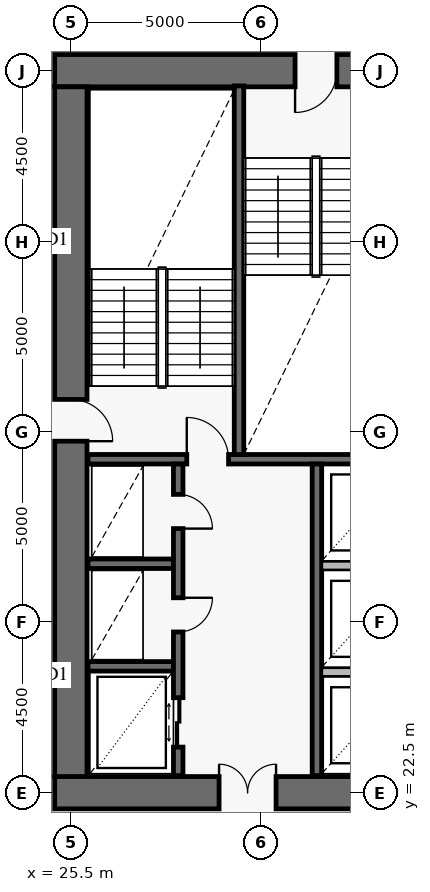
"""IFC4 building model, lengths in metres.
Left out: names, types, materials, properties, quantities, classifications, styles, units other than length and angle.
Written with IfcOpenShell. Run it as: python <this file> out.ifc"""

import sys

from ifc_helpers import new_model, si_unit, direction, frame, frame_2d, origin, place, context, subcontext, project, spatial, rectangle, extrude, element, fill, save


model = new_model("IFC4")
c1 = context("Model", 3, precision=1e-05, world=origin(), true_north=direction((0.0, 1.0)))
c2 = subcontext(c1, "Body", "Model", "MODEL_VIEW")
j1 = project(units=[si_unit("LENGTHUNIT", "METRE"), si_unit("PLANEANGLEUNIT", "RADIAN")], contexts=[c1])
p1 = place(None, origin())
s1 = spatial("IfcSite", under=j1, at=p1, CompositionType="ELEMENT")
p2 = place(p1, origin())
s2 = spatial("IfcBuilding", under=s1, at=p2, CompositionType="ELEMENT")
p3 = place(p2, frame((0.0, 0.0, 28.8)))
s3 = spatial("IfcBuildingStorey", under=s2, at=p3, CompositionType="ELEMENT", Elevation=28.8)
p4 = place(p3, frame((25.075, 22.5, 0.0), z_axis=(0.0, 0.0, 1.0), x_axis=(1.0, 0.0, 0.0)))
e1 = element("IfcWall", 1, at=p4, inside=s3, PredefinedType="SHEAR", context=c2, shape_type="SweptSolid", body=[
    extrude(rectangle(XDim=9.975, YDim=0.85, at=frame_2d((4.988, 0.0))), origin(), (0.0, 0.0, 1.0), 4.2),
])
p5 = place(p4, frame((4.325, 0.0, 0.0)))
e2 = element("IfcOpeningElement", 2, at=p5, cuts=e1, PredefinedType="OPENING", context=c2, shape_type="SweptSolid", body=[
    extrude(rectangle(XDim=1.5, YDim=2.15, at=frame_2d((0.75, 1.075))), frame((0.0, 0.437, 0.0), z_axis=(0.0, -1.0, 0.0), x_axis=(1.0, 0.0, 0.0)), (0.0, 0.0, 1.0), 0.874),
])
p6 = place(p3, frame((36.75, 41.5, 0.0), z_axis=(0.0, 0.0, 1.0), x_axis=(-1.0, 0.0, 0.0)))
e3 = element("IfcWall", 3, at=p6, inside=s3, PredefinedType="SHEAR", context=c2, shape_type="SweptSolid", body=[
    extrude(rectangle(XDim=11.675, YDim=0.85, at=frame_2d((5.837, 0.0))), origin(), (0.0, 0.0, 1.0), 4.2),
])
p7 = place(p6, frame((4.25, 0.0, 0.0)))
e4 = element("IfcOpeningElement", 4, at=p7, cuts=e3, PredefinedType="OPENING", context=c2, shape_type="SweptSolid", body=[
    extrude(rectangle(XDim=1.1, YDim=2.15, at=frame_2d((0.55, 1.075))), frame((0.0, 0.437, 0.0), z_axis=(0.0, -1.0, 0.0), x_axis=(1.0, 0.0, 0.0)), (0.0, 0.0, 1.0), 0.874),
])
p8 = place(p3, frame((25.5, 22.925, 0.0), z_axis=(0.0, 0.0, 1.0), x_axis=(0.0, 1.0, 0.0)))
e5 = element("IfcWall", 5, at=p8, inside=s3, PredefinedType="SHEAR", context=c2, shape_type="SweptSolid", body=[
    extrude(rectangle(XDim=18.15, YDim=0.85, at=frame_2d((9.075, 0.0))), origin(), (0.0, 0.0, 1.0), 4.2),
])
p9 = place(p8, frame((8.825, 0.0, 0.0)))
e6 = element("IfcOpeningElement", 6, at=p9, cuts=e5, PredefinedType="OPENING", context=c2, shape_type="SweptSolid", body=[
    extrude(rectangle(XDim=1.1, YDim=2.15, at=frame_2d((0.55, 1.075))), frame((0.0, 0.437, 0.0), z_axis=(0.0, -1.0, 0.0), x_axis=(1.0, 0.0, 0.0)), (0.0, 0.0, 1.0), 0.874),
])
p10 = place(p3, frame((25.95, 31.275, 0.0), z_axis=(0.0, 0.0, 1.0), x_axis=(1.0, 0.0, 0.0)))
e7 = element("IfcWall", 7, at=p10, inside=s3, PredefinedType="SOLIDWALL", context=c2, shape_type="SweptSolid", body=[
    extrude(rectangle(XDim=20.1, YDim=0.25, at=frame_2d((10.05, 0.0))), origin(), (0.0, 0.0, 1.0), 4.2),
])
p11 = place(p10, frame((2.6, 0.0, 0.0)))
e8 = element("IfcOpeningElement", 8, at=p11, cuts=e7, PredefinedType="OPENING", context=c2, shape_type="SweptSolid", body=[
    extrude(rectangle(XDim=1.1, YDim=2.15, at=frame_2d((0.55, 1.075))), frame((0.0, 0.137, 0.0), z_axis=(0.0, -1.0, 0.0), x_axis=(1.0, 0.0, 0.0)), (0.0, 0.0, 1.0), 0.274),
])
p12 = place(p10, frame((10.6, 0.0, 0.0)))
e9 = element("IfcOpeningElement", 9, at=p12, cuts=e7, PredefinedType="OPENING", context=c2, shape_type="SweptSolid", body=[
    extrude(rectangle(XDim=1.1, YDim=2.15, at=frame_2d((0.55, 1.075))), frame((0.0, 0.137, 0.0), z_axis=(0.0, -1.0, 0.0), x_axis=(1.0, 0.0, 0.0)), (0.0, 0.0, 1.0), 0.274),
])
p13 = place(p10, frame((16.35, 0.0, 0.0)))
e10 = element("IfcOpeningElement", 10, at=p13, cuts=e7, PredefinedType="OPENING", context=c2, shape_type="SweptSolid", body=[
    extrude(rectangle(XDim=1.1, YDim=2.15, at=frame_2d((0.55, 1.075))), frame((0.0, 0.137, 0.0), z_axis=(0.0, -1.0, 0.0), x_axis=(1.0, 0.0, 0.0)), (0.0, 0.0, 1.0), 0.274),
])
p14 = place(p3, frame((29.925, 31.4, 0.0), z_axis=(0.0, 0.0, 1.0), x_axis=(0.0, 1.0, 0.0)))
e11 = element("IfcWall", 11, at=p14, inside=s3, PredefinedType="SOLIDWALL", context=c2, shape_type="SweptSolid", body=[
    extrude(rectangle(XDim=9.7, YDim=0.25, at=frame_2d((4.85, 0.0))), origin(), (0.0, 0.0, 1.0), 4.2),
])
for number, where, z_axis, x_axis in (
    (12, (25.95, 25.825, 0.0), (0.0, 0.0, 1.0), (1.0, 0.0, 0.0)),
    (13, (25.95, 28.525, 0.0), (0.0, 0.0, 1.0), (1.0, 0.0, 0.0)),
):
    element("IfcWall", number, at=place(p3, frame(where, z_axis=z_axis, x_axis=x_axis)), inside=s3, PredefinedType="SOLIDWALL", context=c2, shape_type="SweptSolid", body=[
        extrude(rectangle(XDim=2.25, YDim=0.25, at=frame_2d((1.125, 0.0))), origin(), (0.0, 0.0, 1.0), 4.2),
    ])
p15 = place(p3, frame((28.325, 22.95, 0.0), z_axis=(0.0, 0.0, 1.0), x_axis=(0.0, 1.0, 0.0)))
e14 = element("IfcWall", 14, at=p15, inside=s3, PredefinedType="SOLIDWALL", context=c2, shape_type="SweptSolid", body=[
    extrude(rectangle(XDim=8.2, YDim=0.25, at=frame_2d((4.1, 0.0))), origin(), (0.0, 0.0, 1.0), 4.2),
])
p16 = place(p15, frame((0.75, 0.0, 0.0)))
e15 = element("IfcOpeningElement", 15, at=p16, cuts=e14, PredefinedType="OPENING", context=c2, shape_type="SweptSolid", body=[
    extrude(rectangle(XDim=1.3, YDim=2.3, at=frame_2d((0.65, 1.15))), frame((0.0, 0.137, 0.0), z_axis=(0.0, -1.0, 0.0), x_axis=(1.0, 0.0, 0.0)), (0.0, 0.0, 1.0), 0.274),
])
p17 = place(p15, frame((3.78, 0.0, 0.0)))
e16 = element("IfcOpeningElement", 16, at=p17, cuts=e14, PredefinedType="OPENING", context=c2, shape_type="SweptSolid", body=[
    extrude(rectangle(XDim=0.9, YDim=2.1, at=frame_2d((0.45, 1.05))), frame((0.0, 0.137, 0.0), z_axis=(0.0, -1.0, 0.0), x_axis=(1.0, 0.0, 0.0)), (0.0, 0.0, 1.0), 0.274),
])
p18 = place(p15, frame((6.5, 0.0, 0.0)))
e17 = element("IfcOpeningElement", 17, at=p18, cuts=e14, PredefinedType="OPENING", context=c2, shape_type="SweptSolid", body=[
    extrude(rectangle(XDim=0.9, YDim=2.1, at=frame_2d((0.45, 1.05))), frame((0.0, 0.137, 0.0), z_axis=(0.0, -1.0, 0.0), x_axis=(1.0, 0.0, 0.0)), (0.0, 0.0, 1.0), 0.274),
])
p19 = place(p3, frame((31.975, 22.95, 0.0), z_axis=(0.0, 0.0, 1.0), x_axis=(0.0, 1.0, 0.0)))
e18 = element("IfcWall", 18, at=p19, inside=s3, PredefinedType="SOLIDWALL", context=c2, shape_type="SweptSolid", body=[
    extrude(rectangle(XDim=8.2, YDim=0.25, at=frame_2d((4.1, 0.0))), origin(), (0.0, 0.0, 1.0), 4.2),
])
for number, where, z_axis, x_axis in (
    (19, (32.108, 25.675, 0.0), (0.0, 0.0, 1.0), (1.0, 0.0, 0.0)),
    (20, (32.108, 28.475, 0.0), (0.0, 0.0, 1.0), (1.0, 0.0, 0.0)),
):
    element("IfcWall", number, at=place(p3, frame(where, z_axis=z_axis, x_axis=x_axis)), inside=s3, PredefinedType="PARTITIONING", context=c2, shape_type="SweptSolid", body=[
        extrude(rectangle(XDim=2.284, YDim=0.22, at=frame_2d((1.142, 0.0))), origin(), (0.0, 0.0, 1.0), 3.92),
    ])
p20 = place(p9, frame((1.1, 0.0, 0.0), z_axis=(0.0, 0.0, 1.0), x_axis=(-1.0, 0.0, 0.0)))
e21 = element("IfcDoor", 21, at=p20, inside=s3, OperationType="SINGLE_SWING_RIGHT", PredefinedType="USERDEFINED", context=c2, shape_type="SweptSolid", body=[
    extrude(rectangle(XDim=1.1, YDim=2.15, at=frame_2d((0.55, 1.075))), frame((0.0, 0.025, 0.0), z_axis=(0.0, -1.0, 0.0), x_axis=(1.0, 0.0, 0.0)), (0.0, 0.0, 1.0), 0.05),
])
fill(e6, e21)
p21 = place(p7, origin())
e22 = element("IfcDoor", 22, at=p21, inside=s3, OperationType="SINGLE_SWING_RIGHT", PredefinedType="USERDEFINED", context=c2, shape_type="SweptSolid", body=[
    extrude(rectangle(XDim=1.1, YDim=2.15, at=frame_2d((0.55, 1.075))), frame((0.0, 0.025, 0.0), z_axis=(0.0, -1.0, 0.0), x_axis=(1.0, 0.0, 0.0)), (0.0, 0.0, 1.0), 0.05),
])
fill(e4, e22)
p22 = place(p5, origin())
e23 = element("IfcDoor", 23, at=p22, inside=s3, OperationType="DOUBLE_DOOR_SINGLE_SWING", PredefinedType="DOOR", context=c2, shape_type="SweptSolid", body=[
    extrude(rectangle(XDim=1.5, YDim=2.15, at=frame_2d((0.75, 1.075))), frame((0.0, 0.025, 0.0), z_axis=(0.0, -1.0, 0.0), x_axis=(1.0, 0.0, 0.0)), (0.0, 0.0, 1.0), 0.05),
])
fill(e2, e23)
p23 = place(p11, origin())
e24 = element("IfcDoor", 24, at=p23, inside=s3, OperationType="SINGLE_SWING_LEFT", PredefinedType="USERDEFINED", context=c2, shape_type="SweptSolid", body=[
    extrude(rectangle(XDim=1.1, YDim=2.15, at=frame_2d((0.55, 1.075))), frame((0.0, 0.025, 0.0), z_axis=(0.0, -1.0, 0.0), x_axis=(1.0, 0.0, 0.0)), (0.0, 0.0, 1.0), 0.05),
])
fill(e8, e24)
p24 = place(p16, frame((1.3, 0.0, 0.0), z_axis=(0.0, 0.0, 1.0), x_axis=(-1.0, 0.0, 0.0)))
e25 = element("IfcDoor", 25, at=p24, inside=s3, OperationType="DOUBLE_DOOR_SLIDING", PredefinedType="DOOR", context=c2, shape_type="SweptSolid", body=[
    extrude(rectangle(XDim=1.3, YDim=2.3, at=frame_2d((0.65, 1.15))), frame((0.0, 0.025, 0.0), z_axis=(0.0, -1.0, 0.0), x_axis=(1.0, 0.0, 0.0)), (0.0, 0.0, 1.0), 0.05),
])
fill(e15, e25)
p25 = place(p17, frame((0.9, 0.0, 0.0), z_axis=(0.0, 0.0, 1.0), x_axis=(-1.0, 0.0, 0.0)))
e26 = element("IfcDoor", 26, at=p25, inside=s3, OperationType="SINGLE_SWING_LEFT", PredefinedType="DOOR", context=c2, shape_type="SweptSolid", body=[
    extrude(rectangle(XDim=0.9, YDim=2.1, at=frame_2d((0.45, 1.05))), frame((0.0, 0.025, 0.0), z_axis=(0.0, -1.0, 0.0), x_axis=(1.0, 0.0, 0.0)), (0.0, 0.0, 1.0), 0.05),
])
fill(e16, e26)
p26 = place(p18, frame((0.9, 0.0, 0.0), z_axis=(0.0, 0.0, 1.0), x_axis=(-1.0, 0.0, 0.0)))
e27 = element("IfcDoor", 27, at=p26, inside=s3, OperationType="SINGLE_SWING_RIGHT", PredefinedType="DOOR", context=c2, shape_type="SweptSolid", body=[
    extrude(rectangle(XDim=0.9, YDim=2.1, at=frame_2d((0.45, 1.05))), frame((0.0, 0.025, 0.0), z_axis=(0.0, -1.0, 0.0), x_axis=(1.0, 0.0, 0.0)), (0.0, 0.0, 1.0), 0.05),
])
fill(e17, e27)
save(model, sys.argv[1])
